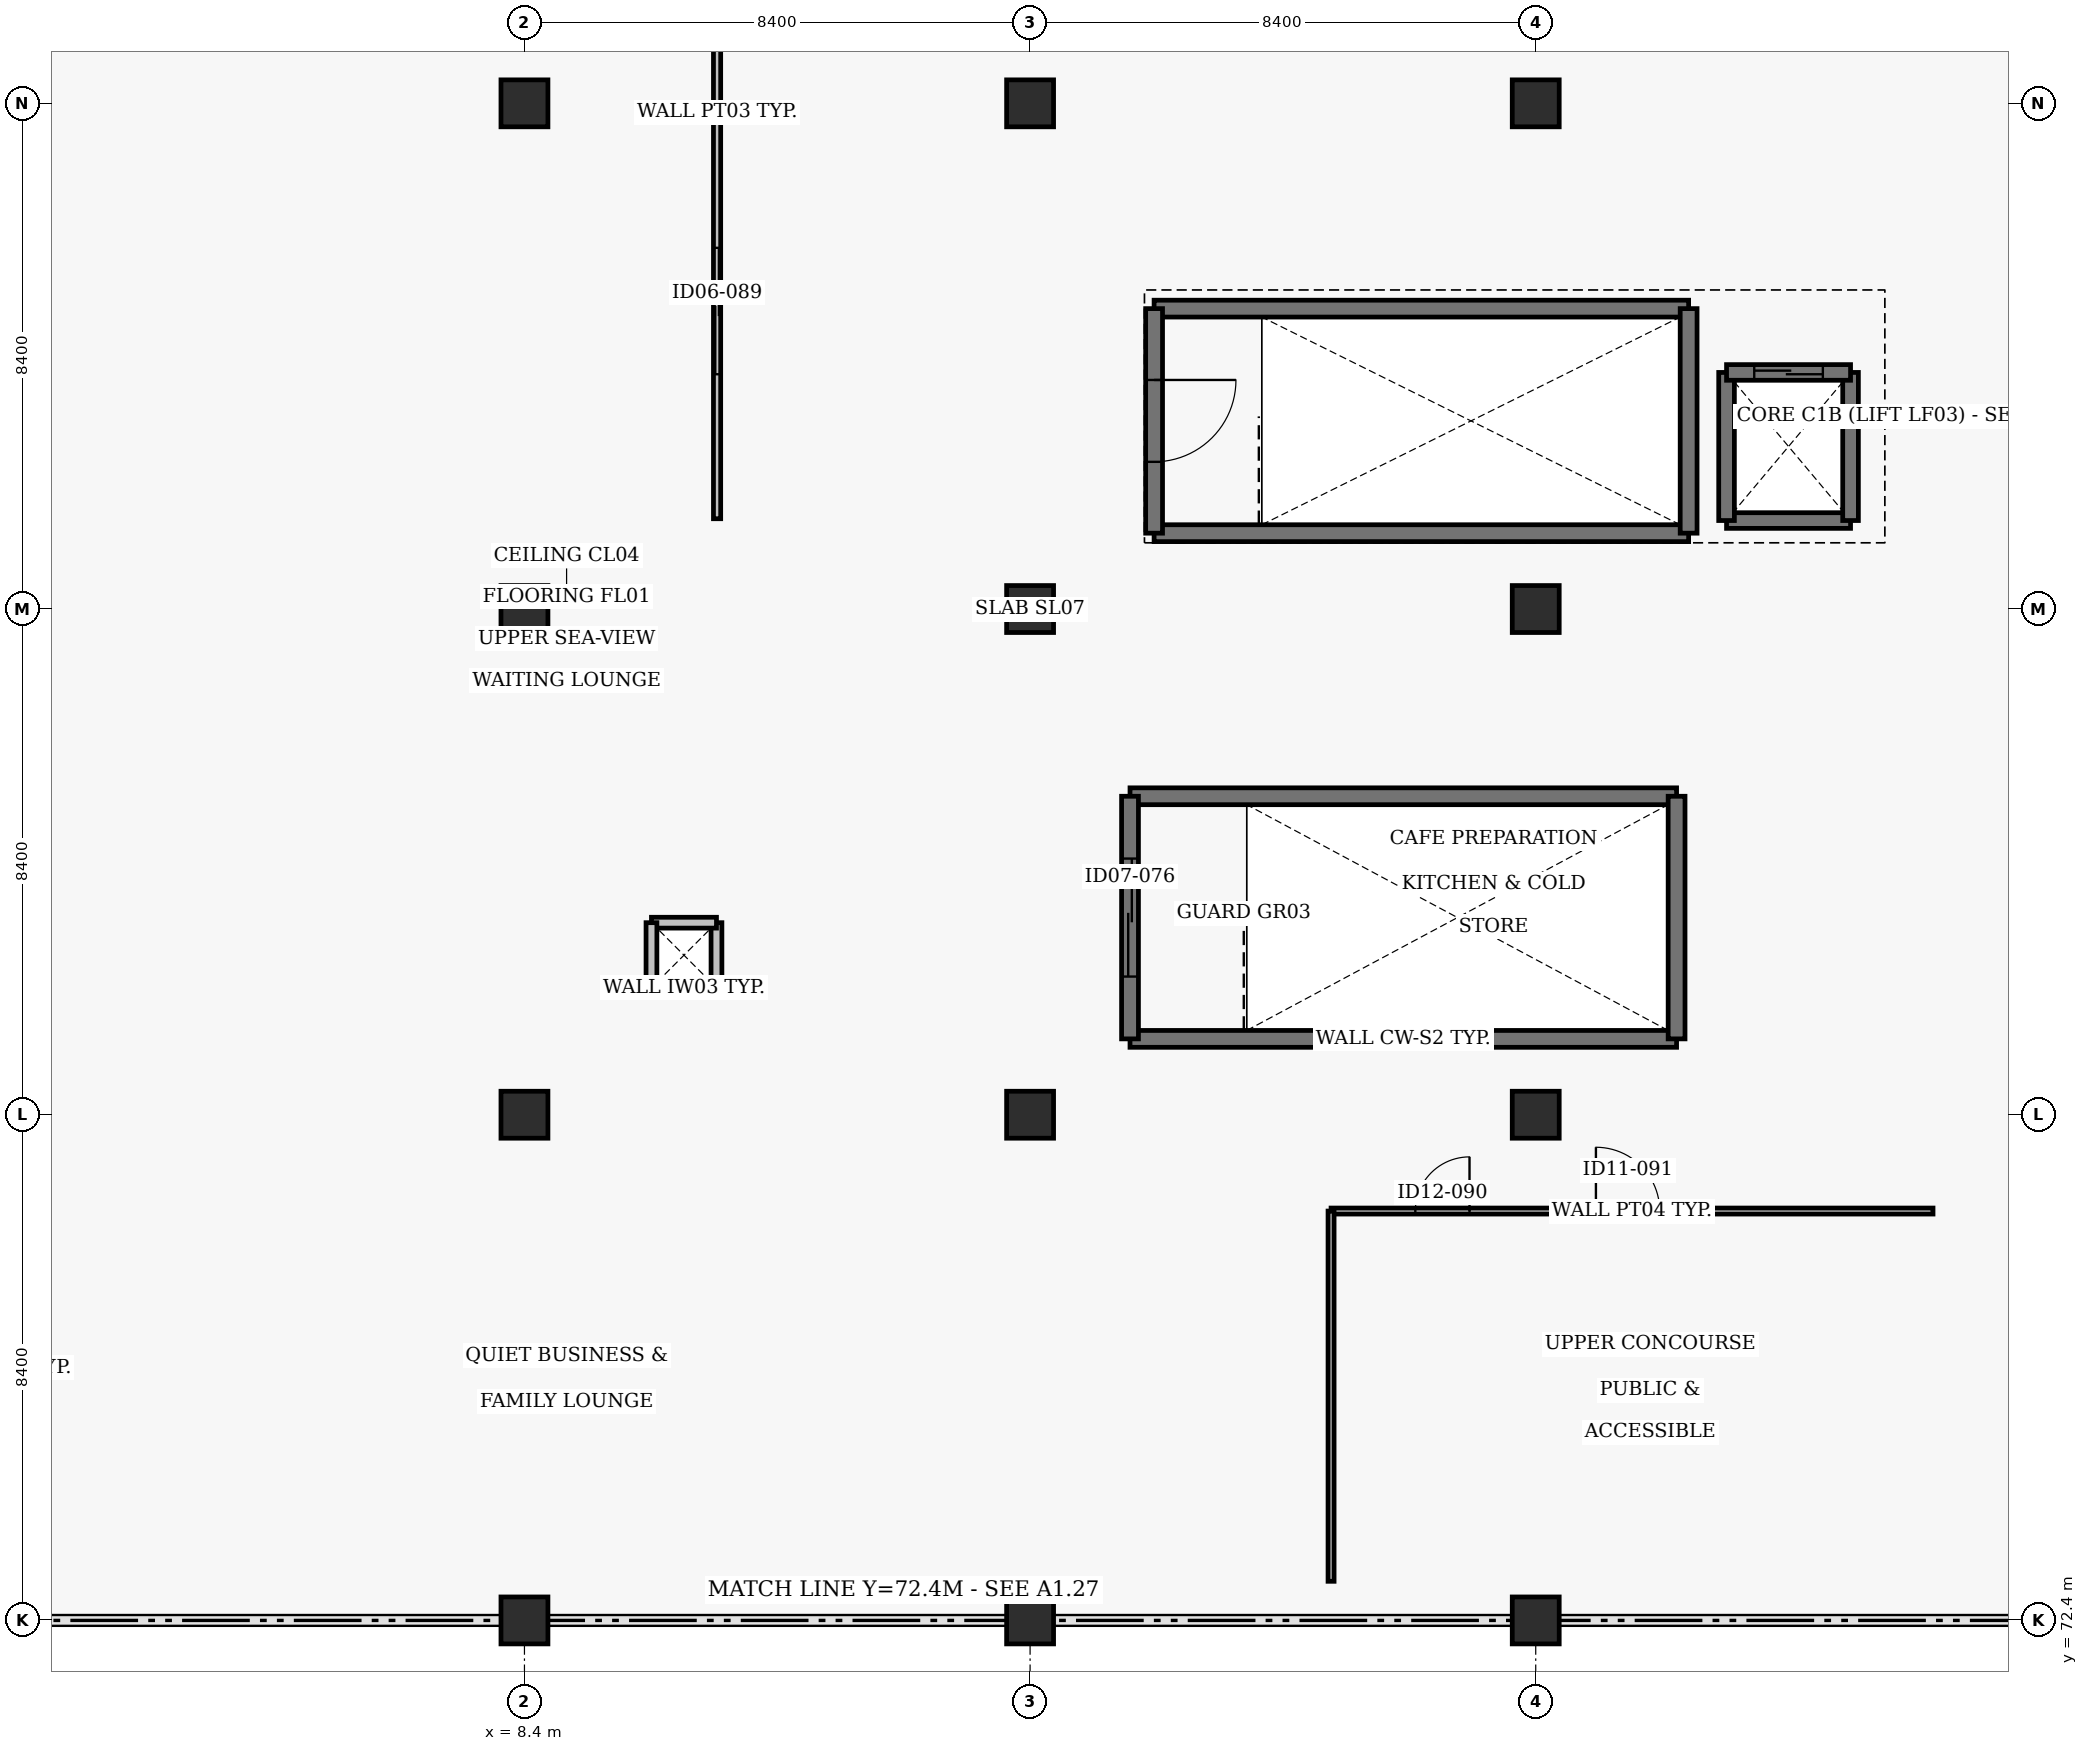
"""IFC4 building model, lengths in metres.
Left out: names, types, materials, properties, quantities, classifications, styles, units other than length and angle.
Written with IfcOpenShell. Run it as: python <this file> out.ifc"""

import sys

from ifc_helpers import new_model, si_unit, direction, frame, frame_2d, origin, origin_2d, place, context, subcontext, project, spatial, rectangle, circle, extrude, element, fill, save


model = new_model("IFC4")
c1 = context("Model", 3, precision=1e-05, world=origin(), true_north=direction((0.0, 1.0)))
c2 = subcontext(c1, "Body", "Model", "MODEL_VIEW")
j1 = project(units=[si_unit("LENGTHUNIT", "METRE"), si_unit("PLANEANGLEUNIT", "RADIAN")], contexts=[c1])
p1 = place(None, origin())
s1 = spatial("IfcSite", under=j1, at=p1, CompositionType="ELEMENT")
p2 = place(p1, origin())
s2 = spatial("IfcBuilding", under=s1, at=p2, CompositionType="ELEMENT")
p3 = place(p2, frame((0.0, 0.0, 9.6)))
s3 = spatial("IfcBuildingStorey", under=s2, at=p3, CompositionType="ELEMENT", Elevation=9.6)
p4 = place(p3, frame((8.4, 72.4, 0.0), z_axis=(0.0, 0.0, 1.0), x_axis=(1.0, 0.0, 0.0)))
e1 = element("IfcColumn", 1, at=p4, inside=s3, PredefinedType="COLUMN", context=c2, shape_type="SweptSolid", body=[
    extrude(circle(Radius=0.39, at=origin_2d()), origin(), (0.0, 0.0, 1.0), 5.565),
])
p5 = place(p3, frame((8.4, 80.8, 0.0), z_axis=(0.0, 0.0, 1.0), x_axis=(1.0, 0.0, 0.0)))
e2 = element("IfcColumn", 2, at=p5, inside=s3, PredefinedType="COLUMN", context=c2, shape_type="SweptSolid", body=[
    extrude(circle(Radius=0.39, at=origin_2d()), origin(), (0.0, 0.0, 1.0), 6.279),
])
p6 = place(p3, frame((8.4, 89.2, 0.0), z_axis=(0.0, 0.0, 1.0), x_axis=(1.0, 0.0, 0.0)))
e3 = element("IfcColumn", 3, at=p6, inside=s3, PredefinedType="COLUMN", context=c2, shape_type="SweptSolid", body=[
    extrude(circle(Radius=0.39, at=origin_2d()), origin(), (0.0, 0.0, 1.0), 6.993),
])
p7 = place(p3, frame((8.4, 97.6, 0.0), z_axis=(0.0, 0.0, 1.0), x_axis=(1.0, 0.0, 0.0)))
e4 = element("IfcColumn", 4, at=p7, inside=s3, PredefinedType="COLUMN", context=c2, shape_type="SweptSolid", body=[
    extrude(circle(Radius=0.39, at=origin_2d()), origin(), (0.0, 0.0, 1.0), 7.708),
])
p8 = place(p3, frame((16.8, 72.4, 0.0), z_axis=(0.0, 0.0, 1.0), x_axis=(1.0, 0.0, 0.0)))
e5 = element("IfcColumn", 5, at=p8, inside=s3, PredefinedType="COLUMN", context=c2, shape_type="SweptSolid", body=[
    extrude(circle(Radius=0.39, at=origin_2d()), origin(), (0.0, 0.0, 1.0), 8.043),
])
p9 = place(p3, frame((16.8, 80.8, 0.0), z_axis=(0.0, 0.0, 1.0), x_axis=(1.0, 0.0, 0.0)))
e6 = element("IfcColumn", 6, at=p9, inside=s3, PredefinedType="COLUMN", context=c2, shape_type="SweptSolid", body=[
    extrude(circle(Radius=0.39, at=origin_2d()), origin(), (0.0, 0.0, 1.0), 8.757),
])
p10 = place(p3, frame((16.8, 89.2, 0.0), z_axis=(0.0, 0.0, 1.0), x_axis=(1.0, 0.0, 0.0)))
e7 = element("IfcColumn", 7, at=p10, inside=s3, PredefinedType="COLUMN", context=c2, shape_type="SweptSolid", body=[
    extrude(circle(Radius=0.39, at=origin_2d()), origin(), (0.0, 0.0, 1.0), 9.471),
])
p11 = place(p3, frame((16.8, 97.6, 0.0), z_axis=(0.0, 0.0, 1.0), x_axis=(1.0, 0.0, 0.0)))
e8 = element("IfcColumn", 8, at=p11, inside=s3, PredefinedType="COLUMN", context=c2, shape_type="SweptSolid", body=[
    extrude(circle(Radius=0.39, at=origin_2d()), origin(), (0.0, 0.0, 1.0), 10.186),
])
p12 = place(p3, frame((25.2, 72.4, 0.0), z_axis=(0.0, 0.0, 1.0), x_axis=(1.0, 0.0, 0.0)))
e9 = element("IfcColumn", 9, at=p12, inside=s3, PredefinedType="COLUMN", context=c2, shape_type="SweptSolid", body=[
    extrude(circle(Radius=0.39, at=origin_2d()), origin(), (0.0, 0.0, 1.0), 5.565),
])
p13 = place(p3, frame((25.2, 80.8, 0.0), z_axis=(0.0, 0.0, 1.0), x_axis=(1.0, 0.0, 0.0)))
e10 = element("IfcColumn", 10, at=p13, inside=s3, PredefinedType="COLUMN", context=c2, shape_type="SweptSolid", body=[
    extrude(circle(Radius=0.39, at=origin_2d()), origin(), (0.0, 0.0, 1.0), 6.279),
])
p14 = place(p3, frame((25.2, 89.2, 0.0), z_axis=(0.0, 0.0, 1.0), x_axis=(1.0, 0.0, 0.0)))
e11 = element("IfcColumn", 11, at=p14, inside=s3, PredefinedType="COLUMN", context=c2, shape_type="SweptSolid", body=[
    extrude(circle(Radius=0.39, at=origin_2d()), origin(), (0.0, 0.0, 1.0), 6.993),
])
p15 = place(p3, frame((25.2, 97.6, 0.0), z_axis=(0.0, 0.0, 1.0), x_axis=(1.0, 0.0, 0.0)))
e12 = element("IfcColumn", 12, at=p15, inside=s3, PredefinedType="COLUMN", context=c2, shape_type="SweptSolid", body=[
    extrude(circle(Radius=0.39, at=origin_2d()), origin(), (0.0, 0.0, 1.0), 7.708),
])
for number, where, z_axis, x_axis in (
    (13, (18.86, 90.46, 0.0), (0.0, 0.0, 1.0), (1.0, 0.0, 0.0)),
    (14, (18.86, 94.19, 0.0), (0.0, 0.0, 1.0), (1.0, 0.0, 0.0)),
):
    element("IfcWall", number, at=place(p3, frame(where, z_axis=z_axis, x_axis=x_axis)), inside=s3, PredefinedType="SHEAR", context=c2, shape_type="SweptSolid", body=[
        extrude(rectangle(XDim=8.88, YDim=0.28, at=frame_2d((4.44, 0.0))), origin(), (0.0, 0.0, 1.0), 2.75),
    ])
p16 = place(p3, frame((18.86, 94.19, 0.0), z_axis=(0.0, 0.0, 1.0), x_axis=(0.0, -1.0, 0.0)))
e15 = element("IfcWall", 15, at=p16, inside=s3, PredefinedType="SHEAR", context=c2, shape_type="SweptSolid", body=[
    extrude(rectangle(XDim=3.73, YDim=0.28, at=frame_2d((1.865, 0.0))), origin(), (0.0, 0.0, 1.0), 2.75),
])
p17 = place(p16, frame((1.185, 0.0, 0.0)))
e16 = element("IfcOpeningElement", 16, at=p17, cuts=e15, PredefinedType="OPENING", context=c2, shape_type="SweptSolid", body=[
    extrude(rectangle(XDim=1.36, YDim=2.15, at=frame_2d((0.68, 1.075))), frame((0.0, 0.15, 0.0), z_axis=(0.0, -1.0, 0.0), x_axis=(1.0, 0.0, 0.0)), (0.0, 0.0, 1.0), 0.3),
])
p18 = place(p3, frame((27.74, 90.46, 0.0), z_axis=(0.0, 0.0, 1.0), x_axis=(0.0, 1.0, 0.0)))
e17 = element("IfcWall", 17, at=p18, inside=s3, PredefinedType="SHEAR", context=c2, shape_type="SweptSolid", body=[
    extrude(rectangle(XDim=3.73, YDim=0.28, at=frame_2d((1.865, 0.0))), origin(), (0.0, 0.0, 1.0), 2.75),
])
p19 = place(p3, frame((28.37, 90.67, 0.0), z_axis=(0.0, 0.0, 1.0), x_axis=(1.0, 0.0, 0.0)))
e18 = element("IfcWall", 18, at=p19, inside=s3, PredefinedType="SHEAR", context=c2, shape_type="SweptSolid", body=[
    extrude(rectangle(XDim=2.06, YDim=0.26, at=frame_2d((1.03, 0.0))), origin(), (0.0, 0.0, 1.0), 2.75),
])
for number, where, z_axis, x_axis in (
    (19, (30.43, 90.67, 0.0), (0.0, 0.0, 1.0), (0.0, 1.0, 0.0)),
    (20, (28.37, 93.13, 0.0), (0.0, 0.0, 1.0), (0.0, -1.0, 0.0)),
):
    element("IfcWall", number, at=place(p3, frame(where, z_axis=z_axis, x_axis=x_axis)), inside=s3, PredefinedType="SHEAR", context=c2, shape_type="SweptSolid", body=[
        extrude(rectangle(XDim=2.46, YDim=0.26, at=frame_2d((1.23, 0.0))), origin(), (0.0, 0.0, 1.0), 2.75),
    ])
p20 = place(p3, frame((28.37, 93.13, 0.0), z_axis=(0.0, 0.0, 1.0), x_axis=(1.0, 0.0, 0.0)))
e21 = element("IfcWall", 21, at=p20, inside=s3, PredefinedType="SHEAR", context=c2, shape_type="SweptSolid", body=[
    extrude(rectangle(XDim=2.06, YDim=0.26, at=frame_2d((1.03, 0.0))), origin(), (0.0, 0.0, 1.0), 2.75),
])
p21 = place(p20, frame((0.46, 0.0, 0.0)))
e22 = element("IfcOpeningElement", 22, at=p21, cuts=e21, PredefinedType="OPENING", context=c2, shape_type="SweptSolid", body=[
    extrude(rectangle(XDim=1.14, YDim=2.14, at=frame_2d((0.57, 1.07))), frame((0.0, 0.14, 0.0), z_axis=(0.0, -1.0, 0.0), x_axis=(1.0, 0.0, 0.0)), (0.0, 0.0, 1.0), 0.28),
])
for number, where, z_axis, x_axis in (
    (23, (18.46, 82.06, 0.0), (0.0, 0.0, 1.0), (1.0, 0.0, 0.0)),
    (24, (18.46, 86.09, 0.0), (0.0, 0.0, 1.0), (1.0, 0.0, 0.0)),
):
    element("IfcWall", number, at=place(p3, frame(where, z_axis=z_axis, x_axis=x_axis)), inside=s3, PredefinedType="SHEAR", context=c2, shape_type="SweptSolid", body=[
        extrude(rectangle(XDim=9.08, YDim=0.28, at=frame_2d((4.54, 0.0))), origin(), (0.0, 0.0, 1.0), 2.75),
    ])
p22 = place(p3, frame((18.46, 86.09, 0.0), z_axis=(0.0, 0.0, 1.0), x_axis=(0.0, -1.0, 0.0)))
e25 = element("IfcWall", 25, at=p22, inside=s3, PredefinedType="SHEAR", context=c2, shape_type="SweptSolid", body=[
    extrude(rectangle(XDim=4.03, YDim=0.28, at=frame_2d((2.015, 0.0))), origin(), (0.0, 0.0, 1.0), 2.75),
])
p23 = place(p22, frame((1.035, 0.0, 0.0)))
e26 = element("IfcOpeningElement", 26, at=p23, cuts=e25, PredefinedType="OPENING", context=c2, shape_type="SweptSolid", body=[
    extrude(rectangle(XDim=1.96, YDim=2.22, at=frame_2d((0.98, 1.11))), frame((0.0, 0.15, 0.0), z_axis=(0.0, -1.0, 0.0), x_axis=(1.0, 0.0, 0.0)), (0.0, 0.0, 1.0), 0.3),
])
p24 = place(p3, frame((27.54, 82.06, 0.0), z_axis=(0.0, 0.0, 1.0), x_axis=(0.0, 1.0, 0.0)))
e27 = element("IfcWall", 27, at=p24, inside=s3, PredefinedType="SHEAR", context=c2, shape_type="SweptSolid", body=[
    extrude(rectangle(XDim=4.03, YDim=0.28, at=frame_2d((2.015, 0.0))), origin(), (0.0, 0.0, 1.0), 2.75),
])
for number, where, z_axis, x_axis in (
    (28, (10.51, 82.91, 0.0), (0.0, 0.0, 1.0), (1.0, 0.0, 0.0)),
    (29, (11.59, 82.91, 0.0), (0.0, 0.0, 1.0), (0.0, 1.0, 0.0)),
    (30, (11.59, 83.99, 0.0), (0.0, 0.0, 1.0), (-1.0, 0.0, 0.0)),
    (31, (10.51, 83.99, 0.0), (0.0, 0.0, 1.0), (0.0, -1.0, 0.0)),
):
    element("IfcWall", number, at=place(p3, frame(where, z_axis=z_axis, x_axis=x_axis)), inside=s3, PredefinedType="SOLIDWALL", context=c2, shape_type="SweptSolid", body=[
        extrude(rectangle(XDim=1.08, YDim=0.18, at=frame_2d((0.54, 0.0))), origin(), (0.0, 0.0, 1.0), 2.6),
    ])
p25 = place(p3, frame((11.6, 90.7, 0.0), z_axis=(0.0, 0.0, 1.0), x_axis=(0.0, 1.0, 0.0)))
e32 = element("IfcWall", 32, at=p25, inside=s3, PredefinedType="PARTITIONING", context=c2, shape_type="SweptSolid", body=[
    extrude(rectangle(XDim=13.5, YDim=0.12, at=frame_2d((6.75, 0.0))), origin(), (0.0, 0.0, 1.0), 2.45),
])
p26 = place(p25, frame((2.4, 0.0, 0.0)))
e33 = element("IfcOpeningElement", 33, at=p26, cuts=e32, PredefinedType="OPENING", context=c2, shape_type="SweptSolid", body=[
    extrude(rectangle(XDim=2.1, YDim=2.22, at=frame_2d((1.05, 1.11))), frame((0.0, 0.07, 0.0), z_axis=(0.0, -1.0, 0.0), x_axis=(1.0, 0.0, 0.0)), (0.0, 0.0, 1.0), 0.14),
])
p27 = place(p3, frame((21.8, 79.2, 0.0), z_axis=(0.0, 0.0, 1.0), x_axis=(1.0, 0.0, 0.0)))
e34 = element("IfcWall", 34, at=p27, inside=s3, PredefinedType="PARTITIONING", context=c2, shape_type="SweptSolid", body=[
    extrude(rectangle(XDim=10.0, YDim=0.1, at=frame_2d((5.0, 0.0))), origin(), (0.0, 0.0, 1.0), 2.45),
])
p28 = place(p27, frame((1.4, 0.0, 0.0)))
e35 = element("IfcOpeningElement", 35, at=p28, cuts=e34, PredefinedType="OPENING", context=c2, shape_type="SweptSolid", body=[
    extrude(rectangle(XDim=0.9, YDim=2.06, at=frame_2d((0.45, 1.03))), frame((0.0, 0.06, 0.0), z_axis=(0.0, -1.0, 0.0), x_axis=(1.0, 0.0, 0.0)), (0.0, 0.0, 1.0), 0.12),
])
p29 = place(p27, frame((4.4, 0.0, 0.0)))
e36 = element("IfcOpeningElement", 36, at=p29, cuts=e34, PredefinedType="OPENING", context=c2, shape_type="SweptSolid", body=[
    extrude(rectangle(XDim=1.06, YDim=2.1, at=frame_2d((0.53, 1.05))), frame((0.0, 0.06, 0.0), z_axis=(0.0, -1.0, 0.0), x_axis=(1.0, 0.0, 0.0)), (0.0, 0.0, 1.0), 0.12),
])
p30 = place(p3, frame((21.8, 73.05, 0.0), z_axis=(0.0, 0.0, 1.0), x_axis=(0.0, 1.0, 0.0)))
e37 = element("IfcWall", 37, at=p30, inside=s3, PredefinedType="PARTITIONING", context=c2, shape_type="SweptSolid", body=[
    extrude(rectangle(XDim=6.15, YDim=0.1, at=frame_2d((3.075, 0.0))), origin(), (0.0, 0.0, 1.0), 2.65),
])
p31 = place(p17, origin())
e38 = element("IfcDoor", 38, at=p31, inside=s3, OperationType="SINGLE_SWING_LEFT", PredefinedType="DOOR", context=c2, shape_type="SweptSolid", body=[
    extrude(rectangle(XDim=1.36, YDim=2.15, at=frame_2d((0.68, 1.075))), frame((0.0, 0.025, 0.0), z_axis=(0.0, -1.0, 0.0), x_axis=(1.0, 0.0, 0.0)), (0.0, 0.0, 1.0), 0.05),
])
fill(e16, e38)
p32 = place(p21, origin())
e39 = element("IfcDoor", 39, at=p32, inside=s3, OperationType="DOUBLE_DOOR_SLIDING", PredefinedType="DOOR", context=c2, shape_type="SweptSolid", body=[
    extrude(rectangle(XDim=1.14, YDim=2.14, at=frame_2d((0.57, 1.07))), frame((0.0, 0.025, 0.0), z_axis=(0.0, -1.0, 0.0), x_axis=(1.0, 0.0, 0.0)), (0.0, 0.0, 1.0), 0.05),
])
fill(e22, e39)
p33 = place(p23, origin())
e40 = element("IfcDoor", 40, at=p33, inside=s3, OperationType="DOUBLE_DOOR_SLIDING", PredefinedType="DOOR", context=c2, shape_type="SweptSolid", body=[
    extrude(rectangle(XDim=1.96, YDim=2.22, at=frame_2d((0.98, 1.11))), frame((0.0, 0.025, 0.0), z_axis=(0.0, -1.0, 0.0), x_axis=(1.0, 0.0, 0.0)), (0.0, 0.0, 1.0), 0.05),
])
fill(e26, e40)
p34 = place(p26, origin())
e41 = element("IfcDoor", 41, at=p34, inside=s3, OperationType="DOUBLE_DOOR_SLIDING", PredefinedType="DOOR", context=c2, shape_type="SweptSolid", body=[
    extrude(rectangle(XDim=2.1, YDim=2.22, at=frame_2d((1.05, 1.11))), frame((0.0, 0.025, 0.0), z_axis=(0.0, -1.0, 0.0), x_axis=(1.0, 0.0, 0.0)), (0.0, 0.0, 1.0), 0.05),
])
fill(e33, e41)
p35 = place(p28, origin())
e42 = element("IfcDoor", 42, at=p35, inside=s3, OperationType="SINGLE_SWING_RIGHT", PredefinedType="DOOR", context=c2, shape_type="SweptSolid", body=[
    extrude(rectangle(XDim=0.9, YDim=2.06, at=frame_2d((0.45, 1.03))), frame((0.0, 0.025, 0.0), z_axis=(0.0, -1.0, 0.0), x_axis=(1.0, 0.0, 0.0)), (0.0, 0.0, 1.0), 0.05),
])
fill(e35, e42)
p36 = place(p29, origin())
e43 = element("IfcDoor", 43, at=p36, inside=s3, OperationType="SINGLE_SWING_LEFT", PredefinedType="DOOR", context=c2, shape_type="SweptSolid", body=[
    extrude(rectangle(XDim=1.06, YDim=2.1, at=frame_2d((0.53, 1.05))), frame((0.0, 0.025, 0.0), z_axis=(0.0, -1.0, 0.0), x_axis=(1.0, 0.0, 0.0)), (0.0, 0.0, 1.0), 0.05),
])
fill(e36, e43)
save(model, sys.argv[1])
